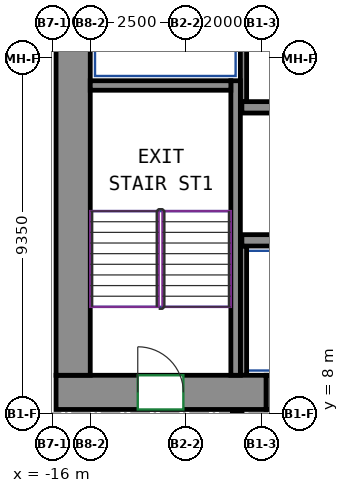
"""IFC4 building model, lengths in metres.
Left out: names, types, materials, properties, quantities, classifications, styles, units other than length and angle.
Written with IfcOpenShell. Run it as: python <this file> out.ifc"""

import sys

from ifc_helpers import new_model, si_unit, direction, frame, frame_2d, origin, place, context, subcontext, project, spatial, rectangle, extrude, source, transform, mapped, element, fill, save


model = new_model("IFC4")
c1 = context("Model", 3, precision=1e-05, world=origin(), true_north=direction((0.0, 1.0)))
c2 = subcontext(c1, "Body", "Model", "MODEL_VIEW")
j1 = project(units=[si_unit("LENGTHUNIT", "METRE"), si_unit("PLANEANGLEUNIT", "RADIAN")], contexts=[c1])
p1 = place(None, origin())
s1 = spatial("IfcSite", under=j1, at=p1, CompositionType="ELEMENT")
p2 = place(p1, origin())
s2 = spatial("IfcBuilding", under=s1, at=p2, CompositionType="ELEMENT")
p3 = place(p2, frame((0.0, 0.0, 175.3)))
s3 = spatial("IfcBuildingStorey", under=s2, at=p3, CompositionType="ELEMENT", Elevation=175.3)
m1 = source(origin(), c2, "Body", "SweptSolid", [
    extrude(rectangle(XDim=5.53, YDim=0.9, at=frame_2d((2.765, 0.0))), origin(), (0.0, 0.0, 1.0), 3.12),
])
p4 = place(p3, frame((-15.9, 8.55, 0.0), z_axis=(0.0, 0.0, 1.0), x_axis=(1.0, 0.0, 0.0)))
e1 = element("IfcWall", 1, at=p4, inside=s3, PredefinedType="SHEAR", context=c2, shape_type="MappedRepresentation", body=[
    mapped(m1, transform((0.0, 0.0, 0.0))),
])
p5 = place(p4, frame((2.15, 0.0, 0.0)))
e2 = element("IfcOpeningElement", 2, at=p5, cuts=e1, PredefinedType="OPENING", context=c2, shape_type="SweptSolid", body=[
    extrude(rectangle(XDim=1.2, YDim=2.1, at=frame_2d((0.6, 1.05))), frame((0.0, 0.46, 0.0), z_axis=(0.0, -1.0, 0.0), x_axis=(1.0, 0.0, 0.0)), (0.0, 0.0, 1.0), 0.92),
])
m2 = source(origin(), c2, "Body", "SweptSolid", [
    extrude(rectangle(XDim=12.0, YDim=0.9, at=frame_2d((6.0, 0.0))), origin(), (0.0, 0.0, 1.0), 3.12),
])
p6 = place(p3, frame((-15.45, 9.0, 0.0), z_axis=(0.0, 0.0, 1.0), x_axis=(0.0, 1.0, 0.0)))
e3 = element("IfcWall", 3, at=p6, inside=s3, PredefinedType="SHEAR", context=c2, shape_type="MappedRepresentation", body=[
    mapped(m2, transform((0.0, 0.0, 0.0))),
])
m3 = source(origin(), c2, "Body", "SweptSolid", [
    extrude(rectangle(XDim=7.75, YDim=0.25, at=frame_2d((3.875, 0.0))), origin(), (0.0, 0.0, 1.0), 3.12),
])
p7 = place(p3, frame((-11.175, 9.0, 0.0), z_axis=(0.0, 0.0, 1.0), x_axis=(0.0, 1.0, 0.0)))
e4 = element("IfcWall", 4, at=p7, inside=s3, PredefinedType="SHEAR", context=c2, shape_type="MappedRepresentation", body=[
    mapped(m3, transform((0.0, 0.0, 0.0))),
])
m4 = source(origin(), c2, "Body", "SweptSolid", [
    extrude(rectangle(XDim=3.7, YDim=0.25, at=frame_2d((1.85, 0.0))), origin(), (0.0, 0.0, 1.0), 3.12),
])
p8 = place(p3, frame((-15.0, 16.625, 0.0), z_axis=(0.0, 0.0, 1.0), x_axis=(1.0, 0.0, 0.0)))
e5 = element("IfcWall", 5, at=p8, inside=s3, PredefinedType="SHEAR", context=c2, shape_type="MappedRepresentation", body=[
    mapped(m4, transform((0.0, 0.0, 0.0))),
])
m5 = source(origin(), c2, "Body", "SweptSolid", [
    extrude(rectangle(XDim=6.0, YDim=0.3, at=frame_2d((3.0, 0.0))), origin(), (0.0, 0.0, 1.0), 3.12),
])
p9 = place(p3, frame((-11.01, 12.55, 0.0), z_axis=(0.0, 0.0, 1.0), x_axis=(1.0, 0.0, 0.0)))
e6 = element("IfcWall", 6, at=p9, inside=s3, PredefinedType="SHEAR", context=c2, shape_type="MappedRepresentation", body=[
    mapped(m5, transform((0.0, 0.0, 0.0))),
])
m6 = source(origin(), c2, "Body", "SweptSolid", [
    extrude(rectangle(XDim=14.04, YDim=0.3, at=frame_2d((7.02, 0.0))), origin(), (0.0, 0.0, 1.0), 3.12),
])
p10 = place(p3, frame((-11.01, 16.05, 0.0), z_axis=(0.0, 0.0, 1.0), x_axis=(1.0, 0.0, 0.0)))
e7 = element("IfcWall", 7, at=p10, inside=s3, PredefinedType="SHEAR", context=c2, shape_type="MappedRepresentation", body=[
    mapped(m6, transform((0.0, 0.0, 0.0))),
])
m7 = source(origin(), c2, "Body", "SweptSolid", [
    extrude(rectangle(XDim=4.8, YDim=0.165, at=frame_2d((2.4, 0.0))), origin(), (0.0, 0.0, 1.0), 3.12),
])
p11 = place(p3, frame((-10.968, 16.2, 0.0), z_axis=(0.0, 0.0, 1.0), x_axis=(0.0, 1.0, 0.0)))
e8 = element("IfcWall", 8, at=p11, inside=s3, PredefinedType="PARTITIONING", context=c2, shape_type="MappedRepresentation", body=[
    mapped(m7, transform((0.0, 0.0, 0.0))),
])
m8 = source(origin(), c2, "Body", "SweptSolid", [
    extrude(rectangle(XDim=3.4, YDim=0.165, at=frame_2d((1.7, 0.0))), origin(), (0.0, 0.0, 1.0), 3.12),
])
p12 = place(p3, frame((-10.968, 9.0, 0.0), z_axis=(0.0, 0.0, 1.0), x_axis=(0.0, 1.0, 0.0)))
e9 = element("IfcWall", 9, at=p12, inside=s3, PredefinedType="PARTITIONING", context=c2, shape_type="MappedRepresentation", body=[
    mapped(m8, transform((0.0, 0.0, 0.0))),
])
m9 = source(origin(), c2, "Body", "SweptSolid", [
    extrude(rectangle(XDim=1.4, YDim=0.9, at=frame_2d((0.7, 0.0))), origin(), (0.0, 0.0, 1.0), 2.7),
])
p13 = place(p3, frame((-10.37, 8.55, 0.0), z_axis=(0.0, 0.0, 1.0), x_axis=(1.0, 0.0, 0.0)))
e10 = element("IfcWall", 10, at=p13, inside=s3, PredefinedType="PARTITIONING", context=c2, shape_type="MappedRepresentation", body=[
    mapped(m9, transform((0.0, 0.0, 0.0))),
])
p14 = place(p13, frame((0.25, 0.0, 0.0)))
e11 = element("IfcOpeningElement", 11, at=p14, cuts=e10, PredefinedType="OPENING", context=c2, shape_type="SweptSolid", body=[
    extrude(rectangle(XDim=0.9, YDim=2.1, at=frame_2d((0.45, 1.05))), frame((0.0, 0.46, 0.0), z_axis=(0.0, -1.0, 0.0), x_axis=(1.0, 0.0, 0.0)), (0.0, 0.0, 1.0), 0.92),
])
p15 = place(p5, origin())
e12 = element("IfcDoor", 12, at=p15, inside=s3, OperationType="DOUBLE_DOOR_SINGLE_SWING", PredefinedType="DOOR", context=c2, shape_type="SweptSolid", body=[
    extrude(rectangle(XDim=1.2, YDim=2.1, at=frame_2d((0.6, 1.05))), frame((0.0, 0.355, 0.0), z_axis=(0.0, -1.0, 0.0), x_axis=(1.0, 0.0, 0.0)), (0.0, 0.0, 1.0), 0.05),
])
fill(e2, e12)
save(model, sys.argv[1])
